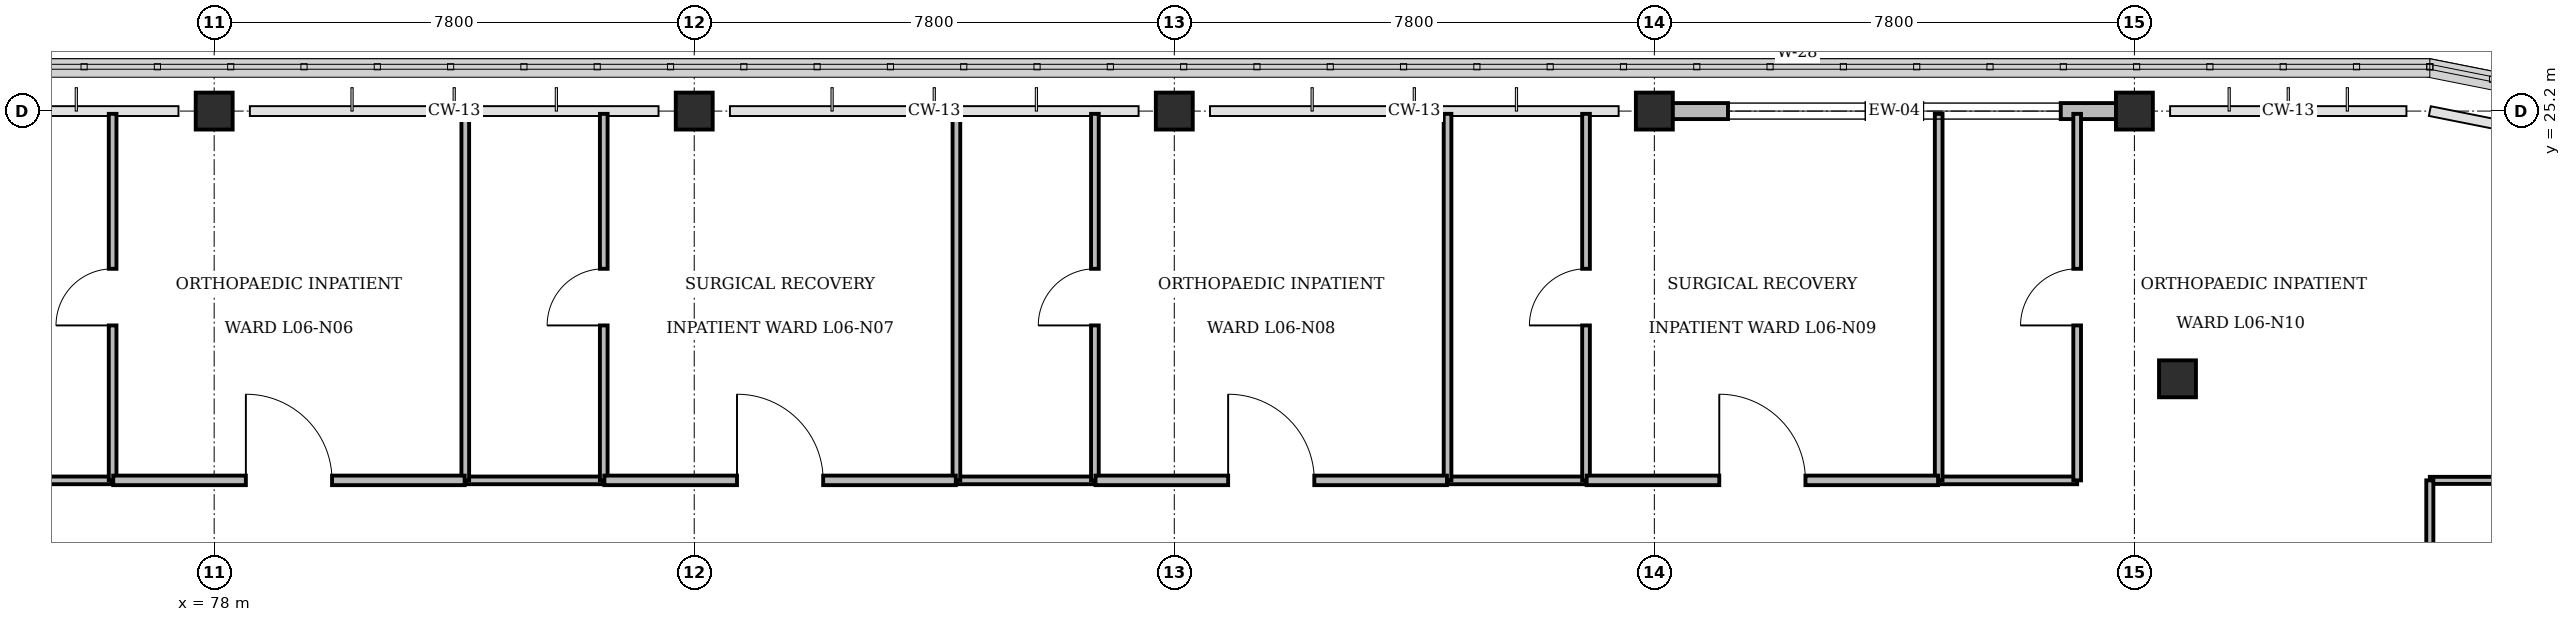
"""IFC4 building model, lengths in metres.
Left out: names, types, materials, properties, quantities, classifications, styles, units other than length and angle.
Written with IfcOpenShell. Run it as: python <this file> out.ifc"""

import sys

from ifc_helpers import new_model, si_unit, direction, frame, frame_2d, origin, origin_2d, place, context, subcontext, project, spatial, rectangle, circle, extrude, element, fill, save


model = new_model("IFC4")
c1 = context("Model", 3, precision=1e-05, world=origin(), true_north=direction((0.0, 1.0)))
c2 = subcontext(c1, "Body", "Model", "MODEL_VIEW")
j1 = project(units=[si_unit("LENGTHUNIT", "METRE"), si_unit("PLANEANGLEUNIT", "RADIAN")], contexts=[c1])
p1 = place(None, origin())
s1 = spatial("IfcSite", under=j1, at=p1, CompositionType="ELEMENT")
p2 = place(p1, origin())
s2 = spatial("IfcBuilding", under=s1, at=p2, CompositionType="ELEMENT")
p3 = place(p2, frame((0.0, 0.0, 26.4)))
s3 = spatial("IfcBuildingStorey", under=s2, at=p3, CompositionType="ELEMENT", Elevation=26.4)
for number, where, z_axis, x_axis in (
    (1, (78.0, 25.2, 0.0), (0.0, 0.0, 1.0), (1.0, 0.0, 0.0)),
    (2, (85.8, 25.2, 0.0), (0.0, 0.0, 1.0), (1.0, 0.0, 0.0)),
    (3, (93.6, 25.2, 0.0), (0.0, 0.0, 1.0), (1.0, 0.0, 0.0)),
    (4, (101.4, 25.2, 0.0), (0.0, 0.0, 1.0), (1.0, 0.0, 0.0)),
    (5, (109.2, 25.2, 0.0), (0.0, 0.0, 1.0), (1.0, 0.0, 0.0)),
):
    element("IfcColumn", number, at=place(p3, frame(where, z_axis=z_axis, x_axis=x_axis)), inside=s3, PredefinedType="COLUMN", context=c2, shape_type="SweptSolid", body=[
        extrude(rectangle(XDim=0.6, YDim=0.6, at=origin_2d()), origin(), (0.0, 0.0, 1.0), 4.2),
    ])
p4 = place(p3, frame((109.9, 20.85, 0.0), z_axis=(0.0, 0.0, 1.0), x_axis=(1.0, 0.0, 0.0)))
e6 = element("IfcColumn", 6, at=p4, inside=s3, PredefinedType="PILASTER", context=c2, shape_type="SweptSolid", body=[
    extrude(circle(Radius=0.3, at=origin_2d()), origin(), (0.0, 0.0, 1.0), 4.2),
])
p5 = place(p3, frame((101.69, 25.2, 0.0), z_axis=(0.0, 0.0, 1.0), x_axis=(1.0, 0.0, 0.0)))
e7 = element("IfcWall", 7, at=p5, inside=s3, PredefinedType="STANDARD", context=c2, shape_type="SweptSolid", body=[
    extrude(rectangle(XDim=7.22, YDim=0.26, at=frame_2d((3.61, 0.0))), origin(), (0.0, 0.0, 1.0), 3.305),
])
p6 = place(p5, frame((0.907, 0.0, 0.85)))
e8 = element("IfcOpeningElement", 8, at=p6, cuts=e7, PredefinedType="OPENING", context=c2, shape_type="SweptSolid", body=[
    extrude(rectangle(XDim=2.25, YDim=1.45, at=frame_2d((1.125, 0.725))), frame((0.0, 0.14, 0.0), z_axis=(0.0, -1.0, 0.0), x_axis=(1.0, 0.0, 0.0)), (0.0, 0.0, 1.0), 0.28),
])
p7 = place(p5, frame((4.063, 0.0, 0.85)))
e9 = element("IfcOpeningElement", 9, at=p7, cuts=e7, PredefinedType="OPENING", context=c2, shape_type="SweptSolid", body=[
    extrude(rectangle(XDim=2.25, YDim=1.45, at=frame_2d((1.125, 0.725))), frame((0.0, 0.14, 0.0), z_axis=(0.0, -1.0, 0.0), x_axis=(1.0, 0.0, 0.0)), (0.0, 0.0, 1.0), 0.28),
])
p8 = place(p3, frame((74.1, 19.2, 0.0), z_axis=(0.0, 0.0, 1.0), x_axis=(1.0, 0.0, 0.0)))
e10 = element("IfcWall", 10, at=p8, inside=s3, PredefinedType="PARTITIONING", context=c2, shape_type="SweptSolid", body=[
    extrude(rectangle(XDim=2.25, YDim=0.125, at=frame_2d((1.125, 0.0))), origin(), (0.0, 0.0, 1.0), 3.9),
])
p9 = place(p3, frame((76.35, 19.2, 0.0), z_axis=(0.0, 0.0, 1.0), x_axis=(0.0, 1.0, 0.0)))
e11 = element("IfcWall", 11, at=p9, inside=s3, PredefinedType="PARTITIONING", context=c2, shape_type="SweptSolid", body=[
    extrude(rectangle(XDim=5.955, YDim=0.125, at=frame_2d((2.978, 0.0))), origin(), (0.0, 0.0, 1.0), 3.9),
])
p10 = place(p9, frame((2.518, 0.0, 0.0)))
e12 = element("IfcOpeningElement", 12, at=p10, cuts=e11, PredefinedType="OPENING", context=c2, shape_type="SweptSolid", body=[
    extrude(rectangle(XDim=0.92, YDim=2.1, at=frame_2d((0.46, 1.05))), frame((0.0, 0.073, 0.0), z_axis=(0.0, -1.0, 0.0), x_axis=(1.0, 0.0, 0.0)), (0.0, 0.0, 1.0), 0.145),
])
p11 = place(p3, frame((82.08, 19.2, 0.0), z_axis=(0.0, 0.0, 1.0), x_axis=(1.0, 0.0, 0.0)))
e13 = element("IfcWall", 13, at=p11, inside=s3, PredefinedType="PARTITIONING", context=c2, shape_type="SweptSolid", body=[
    extrude(rectangle(XDim=2.25, YDim=0.125, at=frame_2d((1.125, 0.0))), origin(), (0.0, 0.0, 1.0), 3.9),
])
p12 = place(p3, frame((82.08, 19.2, 0.0), z_axis=(0.0, 0.0, 1.0), x_axis=(0.0, 1.0, 0.0)))
e14 = element("IfcWall", 14, at=p12, inside=s3, PredefinedType="PARTITIONING", context=c2, shape_type="SweptSolid", body=[
    extrude(rectangle(XDim=5.955, YDim=0.125, at=frame_2d((2.978, 0.0))), origin(), (0.0, 0.0, 1.0), 3.9),
])
p13 = place(p3, frame((84.33, 19.2, 0.0), z_axis=(0.0, 0.0, 1.0), x_axis=(0.0, 1.0, 0.0)))
e15 = element("IfcWall", 15, at=p13, inside=s3, PredefinedType="PARTITIONING", context=c2, shape_type="SweptSolid", body=[
    extrude(rectangle(XDim=5.955, YDim=0.125, at=frame_2d((2.978, 0.0))), origin(), (0.0, 0.0, 1.0), 3.9),
])
p14 = place(p13, frame((2.518, 0.0, 0.0)))
e16 = element("IfcOpeningElement", 16, at=p14, cuts=e15, PredefinedType="OPENING", context=c2, shape_type="SweptSolid", body=[
    extrude(rectangle(XDim=0.92, YDim=2.1, at=frame_2d((0.46, 1.05))), frame((0.0, 0.073, 0.0), z_axis=(0.0, -1.0, 0.0), x_axis=(1.0, 0.0, 0.0)), (0.0, 0.0, 1.0), 0.145),
])
p15 = place(p3, frame((90.06, 19.2, 0.0), z_axis=(0.0, 0.0, 1.0), x_axis=(1.0, 0.0, 0.0)))
e17 = element("IfcWall", 17, at=p15, inside=s3, PredefinedType="PARTITIONING", context=c2, shape_type="SweptSolid", body=[
    extrude(rectangle(XDim=2.25, YDim=0.125, at=frame_2d((1.125, 0.0))), origin(), (0.0, 0.0, 1.0), 3.9),
])
p16 = place(p3, frame((90.06, 19.2, 0.0), z_axis=(0.0, 0.0, 1.0), x_axis=(0.0, 1.0, 0.0)))
e18 = element("IfcWall", 18, at=p16, inside=s3, PredefinedType="PARTITIONING", context=c2, shape_type="SweptSolid", body=[
    extrude(rectangle(XDim=5.955, YDim=0.125, at=frame_2d((2.978, 0.0))), origin(), (0.0, 0.0, 1.0), 3.9),
])
p17 = place(p3, frame((92.31, 19.2, 0.0), z_axis=(0.0, 0.0, 1.0), x_axis=(0.0, 1.0, 0.0)))
e19 = element("IfcWall", 19, at=p17, inside=s3, PredefinedType="PARTITIONING", context=c2, shape_type="SweptSolid", body=[
    extrude(rectangle(XDim=5.955, YDim=0.125, at=frame_2d((2.978, 0.0))), origin(), (0.0, 0.0, 1.0), 3.9),
])
p18 = place(p17, frame((2.518, 0.0, 0.0)))
e20 = element("IfcOpeningElement", 20, at=p18, cuts=e19, PredefinedType="OPENING", context=c2, shape_type="SweptSolid", body=[
    extrude(rectangle(XDim=0.92, YDim=2.1, at=frame_2d((0.46, 1.05))), frame((0.0, 0.073, 0.0), z_axis=(0.0, -1.0, 0.0), x_axis=(1.0, 0.0, 0.0)), (0.0, 0.0, 1.0), 0.145),
])
p19 = place(p3, frame((98.04, 19.2, 0.0), z_axis=(0.0, 0.0, 1.0), x_axis=(1.0, 0.0, 0.0)))
e21 = element("IfcWall", 21, at=p19, inside=s3, PredefinedType="PARTITIONING", context=c2, shape_type="SweptSolid", body=[
    extrude(rectangle(XDim=2.25, YDim=0.125, at=frame_2d((1.125, 0.0))), origin(), (0.0, 0.0, 1.0), 3.9),
])
p20 = place(p3, frame((98.04, 19.2, 0.0), z_axis=(0.0, 0.0, 1.0), x_axis=(0.0, 1.0, 0.0)))
e22 = element("IfcWall", 22, at=p20, inside=s3, PredefinedType="PARTITIONING", context=c2, shape_type="SweptSolid", body=[
    extrude(rectangle(XDim=5.955, YDim=0.125, at=frame_2d((2.978, 0.0))), origin(), (0.0, 0.0, 1.0), 3.9),
])
p21 = place(p3, frame((100.29, 19.2, 0.0), z_axis=(0.0, 0.0, 1.0), x_axis=(0.0, 1.0, 0.0)))
e23 = element("IfcWall", 23, at=p21, inside=s3, PredefinedType="PARTITIONING", context=c2, shape_type="SweptSolid", body=[
    extrude(rectangle(XDim=5.955, YDim=0.125, at=frame_2d((2.978, 0.0))), origin(), (0.0, 0.0, 1.0), 3.9),
])
p22 = place(p21, frame((2.518, 0.0, 0.0)))
e24 = element("IfcOpeningElement", 24, at=p22, cuts=e23, PredefinedType="OPENING", context=c2, shape_type="SweptSolid", body=[
    extrude(rectangle(XDim=0.92, YDim=2.1, at=frame_2d((0.46, 1.05))), frame((0.0, 0.073, 0.0), z_axis=(0.0, -1.0, 0.0), x_axis=(1.0, 0.0, 0.0)), (0.0, 0.0, 1.0), 0.145),
])
p23 = place(p3, frame((106.02, 19.2, 0.0), z_axis=(0.0, 0.0, 1.0), x_axis=(1.0, 0.0, 0.0)))
e25 = element("IfcWall", 25, at=p23, inside=s3, PredefinedType="PARTITIONING", context=c2, shape_type="SweptSolid", body=[
    extrude(rectangle(XDim=2.25, YDim=0.125, at=frame_2d((1.125, 0.0))), origin(), (0.0, 0.0, 1.0), 3.9),
])
p24 = place(p3, frame((106.02, 19.2, 0.0), z_axis=(0.0, 0.0, 1.0), x_axis=(0.0, 1.0, 0.0)))
e26 = element("IfcWall", 26, at=p24, inside=s3, PredefinedType="PARTITIONING", context=c2, shape_type="SweptSolid", body=[
    extrude(rectangle(XDim=5.955, YDim=0.125, at=frame_2d((2.978, 0.0))), origin(), (0.0, 0.0, 1.0), 3.9),
])
p25 = place(p3, frame((108.27, 19.2, 0.0), z_axis=(0.0, 0.0, 1.0), x_axis=(0.0, 1.0, 0.0)))
e27 = element("IfcWall", 27, at=p25, inside=s3, PredefinedType="PARTITIONING", context=c2, shape_type="SweptSolid", body=[
    extrude(rectangle(XDim=5.955, YDim=0.125, at=frame_2d((2.978, 0.0))), origin(), (0.0, 0.0, 1.0), 3.9),
])
p26 = place(p25, frame((2.518, 0.0, 0.0)))
e28 = element("IfcOpeningElement", 28, at=p26, cuts=e27, PredefinedType="OPENING", context=c2, shape_type="SweptSolid", body=[
    extrude(rectangle(XDim=0.92, YDim=2.1, at=frame_2d((0.46, 1.05))), frame((0.0, 0.073, 0.0), z_axis=(0.0, -1.0, 0.0), x_axis=(1.0, 0.0, 0.0)), (0.0, 0.0, 1.0), 0.145),
])
p27 = place(p3, frame((114.0, 19.2, 0.0), z_axis=(0.0, 0.0, 1.0), x_axis=(1.0, 0.0, 0.0)))
e29 = element("IfcWall", 29, at=p27, inside=s3, PredefinedType="PARTITIONING", context=c2, shape_type="SweptSolid", body=[
    extrude(rectangle(XDim=12.1, YDim=0.115, at=frame_2d((6.05, 0.0))), origin(), (0.0, 0.0, 1.0), 3.9),
])
p28 = place(p3, frame((114.0, 6.0, 0.0), z_axis=(0.0, 0.0, 1.0), x_axis=(0.0, 1.0, 0.0)))
e30 = element("IfcWall", 30, at=p28, inside=s3, PredefinedType="PARTITIONING", context=c2, shape_type="SweptSolid", body=[
    extrude(rectangle(XDim=13.2, YDim=0.115, at=frame_2d((6.6, 0.0))), origin(), (0.0, 0.0, 1.0), 3.9),
])
p29 = place(p28, frame((0.85, 0.0, 0.0)))
e31 = element("IfcOpeningElement", 31, at=p29, cuts=e30, PredefinedType="OPENING", context=c2, shape_type="SweptSolid", body=[
    extrude(rectangle(XDim=1.32, YDim=2.15, at=frame_2d((0.66, 1.075))), frame((0.0, 0.067, 0.0), z_axis=(0.0, -1.0, 0.0), x_axis=(1.0, 0.0, 0.0)), (0.0, 0.0, 1.0), 0.135),
])
p30 = place(p3, frame((76.36, 19.2, 0.0), z_axis=(0.0, 0.0, 1.0), x_axis=(1.0, 0.0, 0.0)))
e32 = element("IfcWall", 32, at=p30, inside=s3, PredefinedType="PARTITIONING", context=c2, shape_type="SweptSolid", body=[
    extrude(rectangle(XDim=5.71, YDim=0.155, at=frame_2d((2.855, 0.0))), origin(), (0.0, 0.0, 1.0), 3.9),
])
p31 = place(p30, frame((2.155, 0.0, 0.0)))
e33 = element("IfcOpeningElement", 33, at=p31, cuts=e32, PredefinedType="OPENING", context=c2, shape_type="SweptSolid", body=[
    extrude(rectangle(XDim=1.4, YDim=2.2, at=frame_2d((0.7, 1.1))), frame((0.0, 0.087, 0.0), z_axis=(0.0, -1.0, 0.0), x_axis=(1.0, 0.0, 0.0)), (0.0, 0.0, 1.0), 0.175),
])
p32 = place(p3, frame((84.34, 19.2, 0.0), z_axis=(0.0, 0.0, 1.0), x_axis=(1.0, 0.0, 0.0)))
e34 = element("IfcWall", 34, at=p32, inside=s3, PredefinedType="PARTITIONING", context=c2, shape_type="SweptSolid", body=[
    extrude(rectangle(XDim=5.71, YDim=0.155, at=frame_2d((2.855, 0.0))), origin(), (0.0, 0.0, 1.0), 3.9),
])
p33 = place(p32, frame((2.155, 0.0, 0.0)))
e35 = element("IfcOpeningElement", 35, at=p33, cuts=e34, PredefinedType="OPENING", context=c2, shape_type="SweptSolid", body=[
    extrude(rectangle(XDim=1.4, YDim=2.2, at=frame_2d((0.7, 1.1))), frame((0.0, 0.087, 0.0), z_axis=(0.0, -1.0, 0.0), x_axis=(1.0, 0.0, 0.0)), (0.0, 0.0, 1.0), 0.175),
])
p34 = place(p3, frame((92.32, 19.2, 0.0), z_axis=(0.0, 0.0, 1.0), x_axis=(1.0, 0.0, 0.0)))
e36 = element("IfcWall", 36, at=p34, inside=s3, PredefinedType="PARTITIONING", context=c2, shape_type="SweptSolid", body=[
    extrude(rectangle(XDim=5.71, YDim=0.155, at=frame_2d((2.855, 0.0))), origin(), (0.0, 0.0, 1.0), 3.9),
])
p35 = place(p34, frame((2.155, 0.0, 0.0)))
e37 = element("IfcOpeningElement", 37, at=p35, cuts=e36, PredefinedType="OPENING", context=c2, shape_type="SweptSolid", body=[
    extrude(rectangle(XDim=1.4, YDim=2.2, at=frame_2d((0.7, 1.1))), frame((0.0, 0.087, 0.0), z_axis=(0.0, -1.0, 0.0), x_axis=(1.0, 0.0, 0.0)), (0.0, 0.0, 1.0), 0.175),
])
p36 = place(p3, frame((100.3, 19.2, 0.0), z_axis=(0.0, 0.0, 1.0), x_axis=(1.0, 0.0, 0.0)))
e38 = element("IfcWall", 38, at=p36, inside=s3, PredefinedType="PARTITIONING", context=c2, shape_type="SweptSolid", body=[
    extrude(rectangle(XDim=5.71, YDim=0.155, at=frame_2d((2.855, 0.0))), origin(), (0.0, 0.0, 1.0), 3.9),
])
p37 = place(p36, frame((2.155, 0.0, 0.0)))
e39 = element("IfcOpeningElement", 39, at=p37, cuts=e38, PredefinedType="OPENING", context=c2, shape_type="SweptSolid", body=[
    extrude(rectangle(XDim=1.4, YDim=2.2, at=frame_2d((0.7, 1.1))), frame((0.0, 0.087, 0.0), z_axis=(0.0, -1.0, 0.0), x_axis=(1.0, 0.0, 0.0)), (0.0, 0.0, 1.0), 0.175),
])
p38 = place(p6, origin())
e40 = element("IfcWindow", 40, at=p38, inside=s3, PartitioningType="SINGLE_PANEL", PredefinedType="WINDOW", context=c2, shape_type="SweptSolid", body=[
    extrude(rectangle(XDim=2.25, YDim=1.45, at=frame_2d((1.125, 0.725))), frame((0.0, 0.03, 0.0), z_axis=(0.0, -1.0, 0.0), x_axis=(1.0, 0.0, 0.0)), (0.0, 0.0, 1.0), 0.06),
])
fill(e8, e40)
p39 = place(p7, origin())
e41 = element("IfcWindow", 41, at=p39, inside=s3, PartitioningType="SINGLE_PANEL", PredefinedType="WINDOW", context=c2, shape_type="SweptSolid", body=[
    extrude(rectangle(XDim=2.25, YDim=1.45, at=frame_2d((1.125, 0.725))), frame((0.0, 0.03, 0.0), z_axis=(0.0, -1.0, 0.0), x_axis=(1.0, 0.0, 0.0)), (0.0, 0.0, 1.0), 0.06),
])
fill(e9, e41)
p40 = place(p10, origin())
e42 = element("IfcDoor", 42, at=p40, inside=s3, OperationType="SINGLE_SWING_LEFT", PredefinedType="DOOR", context=c2, shape_type="SweptSolid", body=[
    extrude(rectangle(XDim=0.92, YDim=2.1, at=frame_2d((0.46, 1.05))), frame((0.0, 0.025, 0.0), z_axis=(0.0, -1.0, 0.0), x_axis=(1.0, 0.0, 0.0)), (0.0, 0.0, 1.0), 0.05),
])
fill(e12, e42)
p41 = place(p14, origin())
e43 = element("IfcDoor", 43, at=p41, inside=s3, OperationType="SINGLE_SWING_LEFT", PredefinedType="DOOR", context=c2, shape_type="SweptSolid", body=[
    extrude(rectangle(XDim=0.92, YDim=2.1, at=frame_2d((0.46, 1.05))), frame((0.0, 0.025, 0.0), z_axis=(0.0, -1.0, 0.0), x_axis=(1.0, 0.0, 0.0)), (0.0, 0.0, 1.0), 0.05),
])
fill(e16, e43)
p42 = place(p18, origin())
e44 = element("IfcDoor", 44, at=p42, inside=s3, OperationType="SINGLE_SWING_LEFT", PredefinedType="DOOR", context=c2, shape_type="SweptSolid", body=[
    extrude(rectangle(XDim=0.92, YDim=2.1, at=frame_2d((0.46, 1.05))), frame((0.0, 0.025, 0.0), z_axis=(0.0, -1.0, 0.0), x_axis=(1.0, 0.0, 0.0)), (0.0, 0.0, 1.0), 0.05),
])
fill(e20, e44)
p43 = place(p22, origin())
e45 = element("IfcDoor", 45, at=p43, inside=s3, OperationType="SINGLE_SWING_LEFT", PredefinedType="DOOR", context=c2, shape_type="SweptSolid", body=[
    extrude(rectangle(XDim=0.92, YDim=2.1, at=frame_2d((0.46, 1.05))), frame((0.0, 0.025, 0.0), z_axis=(0.0, -1.0, 0.0), x_axis=(1.0, 0.0, 0.0)), (0.0, 0.0, 1.0), 0.05),
])
fill(e24, e45)
p44 = place(p26, origin())
e46 = element("IfcDoor", 46, at=p44, inside=s3, OperationType="SINGLE_SWING_LEFT", PredefinedType="DOOR", context=c2, shape_type="SweptSolid", body=[
    extrude(rectangle(XDim=0.92, YDim=2.1, at=frame_2d((0.46, 1.05))), frame((0.0, 0.025, 0.0), z_axis=(0.0, -1.0, 0.0), x_axis=(1.0, 0.0, 0.0)), (0.0, 0.0, 1.0), 0.05),
])
fill(e28, e46)
p45 = place(p31, origin())
e47 = element("IfcDoor", 47, at=p45, inside=s3, OperationType="SINGLE_SWING_LEFT", PredefinedType="DOOR", context=c2, shape_type="SweptSolid", body=[
    extrude(rectangle(XDim=1.4, YDim=2.2, at=frame_2d((0.7, 1.1))), frame((0.0, 0.025, 0.0), z_axis=(0.0, -1.0, 0.0), x_axis=(1.0, 0.0, 0.0)), (0.0, 0.0, 1.0), 0.05),
])
fill(e33, e47)
p46 = place(p33, origin())
e48 = element("IfcDoor", 48, at=p46, inside=s3, OperationType="SINGLE_SWING_LEFT", PredefinedType="DOOR", context=c2, shape_type="SweptSolid", body=[
    extrude(rectangle(XDim=1.4, YDim=2.2, at=frame_2d((0.7, 1.1))), frame((0.0, 0.025, 0.0), z_axis=(0.0, -1.0, 0.0), x_axis=(1.0, 0.0, 0.0)), (0.0, 0.0, 1.0), 0.05),
])
fill(e35, e48)
p47 = place(p35, origin())
e49 = element("IfcDoor", 49, at=p47, inside=s3, OperationType="SINGLE_SWING_LEFT", PredefinedType="DOOR", context=c2, shape_type="SweptSolid", body=[
    extrude(rectangle(XDim=1.4, YDim=2.2, at=frame_2d((0.7, 1.1))), frame((0.0, 0.025, 0.0), z_axis=(0.0, -1.0, 0.0), x_axis=(1.0, 0.0, 0.0)), (0.0, 0.0, 1.0), 0.05),
])
fill(e37, e49)
p48 = place(p37, origin())
e50 = element("IfcDoor", 50, at=p48, inside=s3, OperationType="SINGLE_SWING_LEFT", PredefinedType="DOOR", context=c2, shape_type="SweptSolid", body=[
    extrude(rectangle(XDim=1.4, YDim=2.2, at=frame_2d((0.7, 1.1))), frame((0.0, 0.025, 0.0), z_axis=(0.0, -1.0, 0.0), x_axis=(1.0, 0.0, 0.0)), (0.0, 0.0, 1.0), 0.05),
])
fill(e39, e50)
save(model, sys.argv[1])
